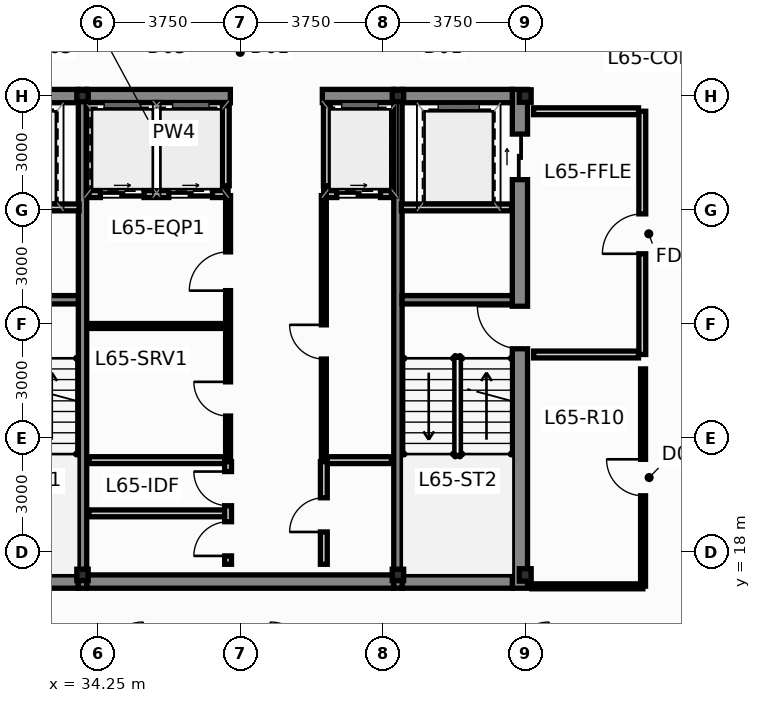
"""IFC4 building model, lengths in metres.
Left out: names, types, materials, properties, quantities, classifications, styles, units other than length and angle.
Written with IfcOpenShell. Run it as: python <this file> out.ifc"""

import sys

from ifc_helpers import new_model, si_unit, direction, frame, frame_2d, origin, origin_2d, place, context, subcontext, project, spatial, rectangle, hollow_rectangle, i_section, extrude, source, transform, mapped, element, fill, save


model = new_model("IFC4")
c1 = context("Model", 3, precision=1e-05, world=origin(), true_north=direction((0.0, 1.0)))
c2 = subcontext(c1, "Body", "Model", "MODEL_VIEW")
j1 = project(units=[si_unit("LENGTHUNIT", "METRE"), si_unit("PLANEANGLEUNIT", "RADIAN")], contexts=[c1])
p1 = place(None, origin())
s1 = spatial("IfcSite", under=j1, at=p1, CompositionType="ELEMENT")
p2 = place(p1, origin())
s2 = spatial("IfcBuilding", under=s1, at=p2, CompositionType="ELEMENT")
p3 = place(p2, frame((0.0, 0.0, 248.1)))
s3 = spatial("IfcBuildingStorey", under=s2, at=p3, CompositionType="ELEMENT", Elevation=248.1)
m1 = source(origin(), c2, "Body", "SweptSolid", [
    extrude(i_section(OverallWidth=0.311, OverallDepth=0.327, WebThickness=0.016, FlangeThickness=0.025, at=origin_2d()), origin(), (0.0, 0.0, 1.0), 3.65),
])
for number, where, z_axis, x_axis in (
    (1, (45.5, 17.4, 0.0), (0.0, 0.0, 1.0), (1.0, 0.0, 0.0)),
    (2, (45.5, 30.0, 0.0), (0.0, 0.0, 1.0), (1.0, 0.0, 0.0)),
):
    element("IfcColumn", number, at=place(p3, frame(where, z_axis=z_axis, x_axis=x_axis)), inside=s3, PredefinedType="COLUMN", context=c2, shape_type="MappedRepresentation", body=[
        mapped(m1, transform((0.0, 0.0, 0.0), scale=1.0)),
    ])
m2 = source(origin(), c2, "Body", "SweptSolid", [
    extrude(hollow_rectangle(XDim=0.3, YDim=0.3, WallThickness=0.012, at=origin_2d()), origin(), (0.0, 0.0, 1.0), 3.65),
])
for number, where, z_axis, x_axis in (
    (3, (33.85, 17.4, 0.0), (0.0, 0.0, 1.0), (1.0, 0.0, 0.0)),
    (4, (42.15, 17.4, 0.0), (0.0, 0.0, 1.0), (1.0, 0.0, 0.0)),
    (5, (33.85, 30.0, 0.0), (0.0, 0.0, 1.0), (1.0, 0.0, 0.0)),
    (6, (42.15, 30.0, 0.0), (0.0, 0.0, 1.0), (1.0, 0.0, 0.0)),
):
    element("IfcColumn", number, at=place(p3, frame(where, z_axis=z_axis, x_axis=x_axis)), inside=s3, PredefinedType="COLUMN", context=c2, shape_type="MappedRepresentation", body=[
        mapped(m2, transform((0.0, 0.0, 0.0), scale=1.0)),
    ])
p4 = place(p3, frame((45.36, 17.05, 0.0), z_axis=(0.0, 0.0, 1.0), x_axis=(0.0, 1.0, 0.0)))
e7 = element("IfcWall", 7, at=p4, inside=s3, PredefinedType="SHEAR", context=c2, shape_type="SweptSolid", body=[
    extrude(rectangle(XDim=13.125, YDim=0.4, at=frame_2d((6.562, 0.0))), origin(), (0.0, 0.0, 1.0), 3.65),
])
p5 = place(p4, frame((6.3, 0.0, 0.0)))
e8 = element("IfcOpeningElement", 8, at=p5, cuts=e7, PredefinedType="OPENING", context=c2, shape_type="SweptSolid", body=[
    extrude(rectangle(XDim=1.12, YDim=2.15, at=frame_2d((0.56, 1.075))), frame((0.0, 0.212, 0.0), z_axis=(0.0, -1.0, 0.0), x_axis=(1.0, 0.0, 0.0)), (0.0, 0.0, 1.0), 0.424),
])
p6 = place(p4, frame((10.75, 0.0, 0.0)))
e9 = element("IfcOpeningElement", 9, at=p6, cuts=e7, PredefinedType="OPENING", context=c2, shape_type="SweptSolid", body=[
    extrude(rectangle(XDim=1.2, YDim=2.2, at=frame_2d((0.6, 1.1))), frame((0.0, 0.212, 0.0), z_axis=(0.0, -1.0, 0.0), x_axis=(1.0, 0.0, 0.0)), (0.0, 0.0, 1.0), 0.424),
])
p7 = place(p3, frame((30.84, 17.225, 0.0), z_axis=(0.0, 0.0, 1.0), x_axis=(1.0, 0.0, 0.0)))
e10 = element("IfcWall", 10, at=p7, inside=s3, PredefinedType="SHEAR", context=c2, shape_type="SweptSolid", body=[
    extrude(rectangle(XDim=2.9, YDim=0.35, at=frame_2d((1.45, 0.0))), origin(), (0.0, 0.0, 1.0), 3.65),
])
p8 = place(p3, frame((33.96, 17.225, 0.0), z_axis=(0.0, 0.0, 1.0), x_axis=(1.0, 0.0, 0.0)))
e11 = element("IfcWall", 11, at=p8, inside=s3, PredefinedType="SHEAR", context=c2, shape_type="SweptSolid", body=[
    extrude(rectangle(XDim=8.08, YDim=0.35, at=frame_2d((4.04, 0.0))), origin(), (0.0, 0.0, 1.0), 3.65),
])
for number, where, z_axis, x_axis in (
    (12, (42.26, 17.225, 0.0), (0.0, 0.0, 1.0), (1.0, 0.0, 0.0)),
    (13, (30.84, 30.0, 0.0), (0.0, 0.0, 1.0), (1.0, 0.0, 0.0)),
):
    element("IfcWall", number, at=place(p3, frame(where, z_axis=z_axis, x_axis=x_axis)), inside=s3, PredefinedType="SHEAR", context=c2, shape_type="SweptSolid", body=[
        extrude(rectangle(XDim=2.9, YDim=0.35, at=frame_2d((1.45, 0.0))), origin(), (0.0, 0.0, 1.0), 3.65),
    ])
p9 = place(p3, frame((33.96, 30.0, 0.0), z_axis=(0.0, 0.0, 1.0), x_axis=(1.0, 0.0, 0.0)))
e14 = element("IfcWall", 14, at=p9, inside=s3, PredefinedType="SHEAR", context=c2, shape_type="SweptSolid", body=[
    extrude(rectangle(XDim=3.78, YDim=0.35, at=frame_2d((1.89, 0.0))), origin(), (0.0, 0.0, 1.0), 3.65),
])
p10 = place(p3, frame((40.16, 30.0, 0.0), z_axis=(0.0, 0.0, 1.0), x_axis=(1.0, 0.0, 0.0)))
e15 = element("IfcWall", 15, at=p10, inside=s3, PredefinedType="SHEAR", context=c2, shape_type="SweptSolid", body=[
    extrude(rectangle(XDim=1.88, YDim=0.35, at=frame_2d((0.94, 0.0))), origin(), (0.0, 0.0, 1.0), 3.65),
])
p11 = place(p3, frame((42.26, 30.0, 0.0), z_axis=(0.0, 0.0, 1.0), x_axis=(1.0, 0.0, 0.0)))
e16 = element("IfcWall", 16, at=p11, inside=s3, PredefinedType="SHEAR", context=c2, shape_type="SweptSolid", body=[
    extrude(rectangle(XDim=2.9, YDim=0.35, at=frame_2d((1.45, 0.0))), origin(), (0.0, 0.0, 1.0), 3.65),
])
for number, where, z_axis, x_axis in (
    (17, (33.85, 17.05, 0.0), (0.0, 0.0, 1.0), (0.0, 1.0, 0.0)),
    (18, (42.15, 17.05, 0.0), (0.0, 0.0, 1.0), (0.0, 1.0, 0.0)),
):
    element("IfcWall", number, at=place(p3, frame(where, z_axis=z_axis, x_axis=x_axis)), inside=s3, PredefinedType="SHEAR", context=c2, shape_type="SweptSolid", body=[
        extrude(rectangle(XDim=13.125, YDim=0.22, at=frame_2d((6.562, 0.0))), origin(), (0.0, 0.0, 1.0), 3.65),
    ])
for number, where, z_axis, x_axis in (
    (19, (30.84, 24.64, 0.0), (0.0, 0.0, 1.0), (1.0, 0.0, 0.0)),
    (20, (42.26, 24.64, 0.0), (0.0, 0.0, 1.0), (1.0, 0.0, 0.0)),
):
    element("IfcWall", number, at=place(p3, frame(where, z_axis=z_axis, x_axis=x_axis)), inside=s3, PredefinedType="SHEAR", context=c2, shape_type="SweptSolid", body=[
        extrude(rectangle(XDim=2.9, YDim=0.22, at=frame_2d((1.45, 0.0))), origin(), (0.0, 0.0, 1.0), 3.65),
    ])
p12 = place(p3, frame((34.02, 27.42, 0.0), z_axis=(0.0, 0.0, 1.0), x_axis=(1.0, 0.0, 0.0)))
e21 = element("IfcWall", 21, at=p12, inside=s3, PredefinedType="PARTITIONING", context=c2, shape_type="SweptSolid", body=[
    extrude(rectangle(XDim=3.66, YDim=0.18, at=frame_2d((1.83, 0.0))), origin(), (0.0, 0.0, 1.0), 3.4),
])
p13 = place(p12, frame((0.3, 0.0, 0.0)))
e22 = element("IfcOpeningElement", 22, at=p13, cuts=e21, PredefinedType="OPENING", context=c2, shape_type="SweptSolid", body=[
    extrude(rectangle(XDim=1.15, YDim=2.2, at=frame_2d((0.575, 1.1))), frame((0.0, 0.102, 0.0), z_axis=(0.0, -1.0, 0.0), x_axis=(1.0, 0.0, 0.0)), (0.0, 0.0, 1.0), 0.204),
])
p14 = place(p12, frame((2.1, 0.0, 0.0)))
e23 = element("IfcOpeningElement", 23, at=p14, cuts=e21, PredefinedType="OPENING", context=c2, shape_type="SweptSolid", body=[
    extrude(rectangle(XDim=1.15, YDim=2.2, at=frame_2d((0.575, 1.1))), frame((0.0, 0.102, 0.0), z_axis=(0.0, -1.0, 0.0), x_axis=(1.0, 0.0, 0.0)), (0.0, 0.0, 1.0), 0.204),
])
p15 = place(p3, frame((40.22, 27.42, 0.0), z_axis=(0.0, 0.0, 1.0), x_axis=(1.0, 0.0, 0.0)))
e24 = element("IfcWall", 24, at=p15, inside=s3, PredefinedType="PARTITIONING", context=c2, shape_type="SweptSolid", body=[
    extrude(rectangle(XDim=1.76, YDim=0.18, at=frame_2d((0.88, 0.0))), origin(), (0.0, 0.0, 1.0), 3.4),
])
p16 = place(p15, frame((0.32, 0.0, 0.0)))
e25 = element("IfcOpeningElement", 25, at=p16, cuts=e24, PredefinedType="OPENING", context=c2, shape_type="SweptSolid", body=[
    extrude(rectangle(XDim=1.15, YDim=2.2, at=frame_2d((0.575, 1.1))), frame((0.0, 0.102, 0.0), z_axis=(0.0, -1.0, 0.0), x_axis=(1.0, 0.0, 0.0)), (0.0, 0.0, 1.0), 0.204),
])
for number, where, z_axis, x_axis in (
    (26, (37.62, 27.64, 0.0), (0.0, 0.0, 1.0), (0.0, 1.0, 0.0)),
    (27, (40.28, 27.64, 0.0), (0.0, 0.0, 1.0), (0.0, 1.0, 0.0)),
):
    element("IfcWall", number, at=place(p3, frame(where, z_axis=z_axis, x_axis=x_axis)), inside=s3, PredefinedType="PARTITIONING", context=c2, shape_type="SweptSolid", body=[
        extrude(rectangle(XDim=2.11, YDim=0.18, at=frame_2d((1.055, 0.0))), origin(), (0.0, 0.0, 1.0), 3.4),
    ])
p17 = place(p3, frame((48.58, 23.2, 0.0), z_axis=(0.0, 0.0, 1.0), x_axis=(0.0, 1.0, 0.0)))
e28 = element("IfcWall", 28, at=p17, inside=s3, PredefinedType="PARTITIONING", context=c2, shape_type="SweptSolid", body=[
    extrude(rectangle(XDim=6.4, YDim=0.18, at=frame_2d((3.2, 0.0))), origin(), (0.0, 0.0, 1.0), 3.085),
])
p18 = place(p17, frame((2.65, 0.0, 0.0)))
e29 = element("IfcOpeningElement", 29, at=p18, cuts=e28, PredefinedType="OPENING", context=c2, shape_type="SweptSolid", body=[
    extrude(rectangle(XDim=1.05, YDim=2.15, at=frame_2d((0.525, 1.075))), frame((0.0, 0.102, 0.0), z_axis=(0.0, -1.0, 0.0), x_axis=(1.0, 0.0, 0.0)), (0.0, 0.0, 1.0), 0.204),
])
for number, where, z_axis, x_axis in (
    (30, (45.72, 23.2, 0.0), (0.0, 0.0, 1.0), (1.0, 0.0, 0.0)),
    (31, (45.72, 29.6, 0.0), (0.0, 0.0, 1.0), (1.0, 0.0, 0.0)),
):
    element("IfcWall", number, at=place(p3, frame(where, z_axis=z_axis, x_axis=x_axis)), inside=s3, PredefinedType="PARTITIONING", context=c2, shape_type="SweptSolid", body=[
        extrude(rectangle(XDim=2.76, YDim=0.18, at=frame_2d((1.38, 0.0))), origin(), (0.0, 0.0, 1.0), 3.4),
    ])
for number, where, z_axis, x_axis in (
    (32, (30.86, 27.07, 0.0), (0.0, 0.0, 1.0), (1.0, 0.0, 0.0)),
    (33, (42.24, 27.07, 0.0), (0.0, 0.0, 1.0), (1.0, 0.0, 0.0)),
):
    element("IfcWall", number, at=place(p3, frame(where, z_axis=z_axis, x_axis=x_axis)), inside=s3, PredefinedType="PARTITIONING", context=c2, shape_type="SweptSolid", body=[
        extrude(rectangle(XDim=2.9, YDim=0.18, at=frame_2d((1.45, 0.0))), origin(), (0.0, 0.0, 1.0), 3.4),
    ])
p19 = place(p3, frame((34.02, 20.42, 0.0), z_axis=(0.0, 0.0, 1.0), x_axis=(1.0, 0.0, 0.0)))
e34 = element("IfcWall", 34, at=p19, inside=s3, PredefinedType="PARTITIONING", context=c2, shape_type="SweptSolid", body=[
    extrude(rectangle(XDim=3.64, YDim=0.18, at=frame_2d((1.82, 0.0))), origin(), (0.0, 0.0, 1.0), 3.4),
])
p20 = place(p3, frame((40.22, 20.42, 0.0), z_axis=(0.0, 0.0, 1.0), x_axis=(1.0, 0.0, 0.0)))
e35 = element("IfcWall", 35, at=p20, inside=s3, PredefinedType="PARTITIONING", context=c2, shape_type="SweptSolid", body=[
    extrude(rectangle(XDim=1.76, YDim=0.18, at=frame_2d((0.88, 0.0))), origin(), (0.0, 0.0, 1.0), 3.4),
])
p21 = place(p3, frame((34.02, 23.95, 0.0), z_axis=(0.0, 0.0, 1.0), x_axis=(1.0, 0.0, 0.0)))
e36 = element("IfcWall", 36, at=p21, inside=s3, PredefinedType="PARTITIONING", context=c2, shape_type="SweptSolid", body=[
    extrude(rectangle(XDim=3.58, YDim=0.13, at=frame_2d((1.79, 0.0))), origin(), (0.0, 0.0, 1.0), 3.4),
])
p22 = place(p3, frame((37.68, 20.48, 0.0), z_axis=(0.0, 0.0, 1.0), x_axis=(0.0, 1.0, 0.0)))
e37 = element("IfcWall", 37, at=p22, inside=s3, PredefinedType="PARTITIONING", context=c2, shape_type="SweptSolid", body=[
    extrude(rectangle(XDim=6.9, YDim=0.13, at=frame_2d((3.45, 0.0))), origin(), (0.0, 0.0, 1.0), 3.4),
])
p23 = place(p22, frame((1.1, 0.0, 0.0)))
e38 = element("IfcOpeningElement", 38, at=p23, cuts=e37, PredefinedType="OPENING", context=c2, shape_type="SweptSolid", body=[
    extrude(rectangle(XDim=0.9, YDim=2.1, at=frame_2d((0.45, 1.05))), frame((0.0, 0.077, 0.0), z_axis=(0.0, -1.0, 0.0), x_axis=(1.0, 0.0, 0.0)), (0.0, 0.0, 1.0), 0.154),
])
p24 = place(p22, frame((4.4, 0.0, 0.0)))
e39 = element("IfcOpeningElement", 39, at=p24, cuts=e37, PredefinedType="OPENING", context=c2, shape_type="SweptSolid", body=[
    extrude(rectangle(XDim=1.02, YDim=2.15, at=frame_2d((0.51, 1.075))), frame((0.0, 0.077, 0.0), z_axis=(0.0, -1.0, 0.0), x_axis=(1.0, 0.0, 0.0)), (0.0, 0.0, 1.0), 0.154),
])
p25 = place(p3, frame((40.2, 20.48, 0.0), z_axis=(0.0, 0.0, 1.0), x_axis=(0.0, 1.0, 0.0)))
e40 = element("IfcWall", 40, at=p25, inside=s3, PredefinedType="PARTITIONING", context=c2, shape_type="SweptSolid", body=[
    extrude(rectangle(XDim=6.9, YDim=0.13, at=frame_2d((3.45, 0.0))), origin(), (0.0, 0.0, 1.0), 3.4),
])
p26 = place(p25, frame((2.6, 0.0, 0.0)))
e41 = element("IfcOpeningElement", 41, at=p26, cuts=e40, PredefinedType="OPENING", context=c2, shape_type="SweptSolid", body=[
    extrude(rectangle(XDim=0.9, YDim=2.1, at=frame_2d((0.45, 1.05))), frame((0.0, 0.077, 0.0), z_axis=(0.0, -1.0, 0.0), x_axis=(1.0, 0.0, 0.0)), (0.0, 0.0, 1.0), 0.154),
])
p27 = place(p3, frame((34.02, 19.02, 0.0), z_axis=(0.0, 0.0, 1.0), x_axis=(1.0, 0.0, 0.0)))
e42 = element("IfcWall", 42, at=p27, inside=s3, PredefinedType="PARTITIONING", context=c2, shape_type="SweptSolid", body=[
    extrude(rectangle(XDim=3.58, YDim=0.18, at=frame_2d((1.79, 0.0))), origin(), (0.0, 0.0, 1.0), 3.4),
])
p28 = place(p3, frame((37.68, 17.68, 0.0), z_axis=(0.0, 0.0, 1.0), x_axis=(0.0, 1.0, 0.0)))
e43 = element("IfcWall", 43, at=p28, inside=s3, PredefinedType="PARTITIONING", context=c2, shape_type="SweptSolid", body=[
    extrude(rectangle(XDim=2.7, YDim=0.18, at=frame_2d((1.35, 0.0))), origin(), (0.0, 0.0, 1.0), 3.4),
])
p29 = place(p28, frame((0.22, 0.0, 0.0)))
e44 = element("IfcOpeningElement", 44, at=p29, cuts=e43, PredefinedType="OPENING", context=c2, shape_type="SweptSolid", body=[
    extrude(rectangle(XDim=0.9, YDim=2.1, at=frame_2d((0.45, 1.05))), frame((0.0, 0.102, 0.0), z_axis=(0.0, -1.0, 0.0), x_axis=(1.0, 0.0, 0.0)), (0.0, 0.0, 1.0), 0.204),
])
p30 = place(p28, frame((1.54, 0.0, 0.0)))
e45 = element("IfcOpeningElement", 45, at=p30, cuts=e43, PredefinedType="OPENING", context=c2, shape_type="SweptSolid", body=[
    extrude(rectangle(XDim=0.9, YDim=2.1, at=frame_2d((0.45, 1.05))), frame((0.0, 0.102, 0.0), z_axis=(0.0, -1.0, 0.0), x_axis=(1.0, 0.0, 0.0)), (0.0, 0.0, 1.0), 0.204),
])
p31 = place(p3, frame((40.2, 17.68, 0.0), z_axis=(0.0, 0.0, 1.0), x_axis=(0.0, 1.0, 0.0)))
e46 = element("IfcWall", 46, at=p31, inside=s3, PredefinedType="PARTITIONING", context=c2, shape_type="SweptSolid", body=[
    extrude(rectangle(XDim=2.7, YDim=0.18, at=frame_2d((1.35, 0.0))), origin(), (0.0, 0.0, 1.0), 3.4),
])
p32 = place(p31, frame((0.85, 0.0, 0.0)))
e47 = element("IfcOpeningElement", 47, at=p32, cuts=e46, PredefinedType="OPENING", context=c2, shape_type="SweptSolid", body=[
    extrude(rectangle(XDim=0.9, YDim=2.1, at=frame_2d((0.45, 1.05))), frame((0.0, 0.102, 0.0), z_axis=(0.0, -1.0, 0.0), x_axis=(1.0, 0.0, 0.0)), (0.0, 0.0, 1.0), 0.204),
])
p33 = place(p3, frame((48.6, 17.105, 0.0), z_axis=(0.0, 0.0, 1.0), x_axis=(0.0, 1.0, 0.0)))
e48 = element("IfcWall", 48, at=p33, inside=s3, PredefinedType="PARTITIONING", context=c2, shape_type="SweptSolid", body=[
    extrude(rectangle(XDim=5.715, YDim=0.13, at=frame_2d((2.857, 0.0))), origin(), (0.0, 0.0, 1.0), 3.085),
])
p34 = place(p33, frame((2.377, 0.0, 0.0)))
e49 = element("IfcOpeningElement", 49, at=p34, cuts=e48, PredefinedType="OPENING", context=c2, shape_type="SweptSolid", body=[
    extrude(rectangle(XDim=0.96, YDim=2.15, at=frame_2d((0.48, 1.075))), frame((0.0, 0.077, 0.0), z_axis=(0.0, -1.0, 0.0), x_axis=(1.0, 0.0, 0.0)), (0.0, 0.0, 1.0), 0.154),
])
p35 = place(p3, frame((45.675, 17.1, 0.0), z_axis=(0.0, 0.0, 1.0), x_axis=(1.0, 0.0, 0.0)))
e50 = element("IfcWall", 50, at=p35, inside=s3, PredefinedType="PARTITIONING", context=c2, shape_type="SweptSolid", body=[
    extrude(rectangle(XDim=2.92, YDim=0.13, at=frame_2d((1.46, 0.0))), origin(), (0.0, 0.0, 1.0), 2.985),
])
p36 = place(p5, origin())
e51 = element("IfcDoor", 51, at=p36, inside=s3, OperationType="SINGLE_SWING_RIGHT", PredefinedType="DOOR", context=c2, shape_type="SweptSolid", body=[
    extrude(rectangle(XDim=1.12, YDim=2.15, at=frame_2d((0.56, 1.075))), frame((0.0, 0.025, 0.0), z_axis=(0.0, -1.0, 0.0), x_axis=(1.0, 0.0, 0.0)), (0.0, 0.0, 1.0), 0.05),
])
fill(e8, e51)
p37 = place(p6, origin())
e52 = element("IfcDoor", 52, at=p37, inside=s3, OperationType="SLIDING_TO_RIGHT", PredefinedType="DOOR", context=c2, shape_type="SweptSolid", body=[
    extrude(rectangle(XDim=1.2, YDim=2.2, at=frame_2d((0.6, 1.1))), frame((0.0, 0.025, 0.0), z_axis=(0.0, -1.0, 0.0), x_axis=(1.0, 0.0, 0.0)), (0.0, 0.0, 1.0), 0.05),
])
fill(e9, e52)
p38 = place(p13, origin())
e53 = element("IfcDoor", 53, at=p38, inside=s3, OperationType="SLIDING_TO_RIGHT", PredefinedType="DOOR", context=c2, shape_type="SweptSolid", body=[
    extrude(rectangle(XDim=1.15, YDim=2.2, at=frame_2d((0.575, 1.1))), frame((0.0, 0.025, 0.0), z_axis=(0.0, -1.0, 0.0), x_axis=(1.0, 0.0, 0.0)), (0.0, 0.0, 1.0), 0.05),
])
fill(e22, e53)
p39 = place(p14, origin())
e54 = element("IfcDoor", 54, at=p39, inside=s3, OperationType="SLIDING_TO_LEFT", PredefinedType="DOOR", context=c2, shape_type="SweptSolid", body=[
    extrude(rectangle(XDim=1.15, YDim=2.2, at=frame_2d((0.575, 1.1))), frame((0.0, 0.025, 0.0), z_axis=(0.0, -1.0, 0.0), x_axis=(1.0, 0.0, 0.0)), (0.0, 0.0, 1.0), 0.05),
])
fill(e23, e54)
p40 = place(p16, origin())
e55 = element("IfcDoor", 55, at=p40, inside=s3, OperationType="SLIDING_TO_RIGHT", PredefinedType="DOOR", context=c2, shape_type="SweptSolid", body=[
    extrude(rectangle(XDim=1.15, YDim=2.2, at=frame_2d((0.575, 1.1))), frame((0.0, 0.025, 0.0), z_axis=(0.0, -1.0, 0.0), x_axis=(1.0, 0.0, 0.0)), (0.0, 0.0, 1.0), 0.05),
])
fill(e25, e55)
p41 = place(p18, origin())
e56 = element("IfcDoor", 56, at=p41, inside=s3, OperationType="SINGLE_SWING_LEFT", PredefinedType="DOOR", context=c2, shape_type="SweptSolid", body=[
    extrude(rectangle(XDim=1.05, YDim=2.15, at=frame_2d((0.525, 1.075))), frame((0.0, 0.025, 0.0), z_axis=(0.0, -1.0, 0.0), x_axis=(1.0, 0.0, 0.0)), (0.0, 0.0, 1.0), 0.05),
])
fill(e29, e56)
p42 = place(p23, origin())
e57 = element("IfcDoor", 57, at=p42, inside=s3, OperationType="SINGLE_SWING_RIGHT", PredefinedType="DOOR", context=c2, shape_type="SweptSolid", body=[
    extrude(rectangle(XDim=0.9, YDim=2.1, at=frame_2d((0.45, 1.05))), frame((0.0, 0.025, 0.0), z_axis=(0.0, -1.0, 0.0), x_axis=(1.0, 0.0, 0.0)), (0.0, 0.0, 1.0), 0.05),
])
fill(e38, e57)
p43 = place(p24, origin())
e58 = element("IfcDoor", 58, at=p43, inside=s3, OperationType="SINGLE_SWING_LEFT", PredefinedType="DOOR", context=c2, shape_type="SweptSolid", body=[
    extrude(rectangle(XDim=1.02, YDim=2.15, at=frame_2d((0.51, 1.075))), frame((0.0, 0.025, 0.0), z_axis=(0.0, -1.0, 0.0), x_axis=(1.0, 0.0, 0.0)), (0.0, 0.0, 1.0), 0.05),
])
fill(e39, e58)
p44 = place(p26, origin())
e59 = element("IfcDoor", 59, at=p44, inside=s3, OperationType="SINGLE_SWING_RIGHT", PredefinedType="DOOR", context=c2, shape_type="SweptSolid", body=[
    extrude(rectangle(XDim=0.9, YDim=2.1, at=frame_2d((0.45, 1.05))), frame((0.0, 0.025, 0.0), z_axis=(0.0, -1.0, 0.0), x_axis=(1.0, 0.0, 0.0)), (0.0, 0.0, 1.0), 0.05),
])
fill(e41, e59)
p45 = place(p29, origin())
e60 = element("IfcDoor", 60, at=p45, inside=s3, OperationType="SINGLE_SWING_LEFT", PredefinedType="DOOR", context=c2, shape_type="SweptSolid", body=[
    extrude(rectangle(XDim=0.9, YDim=2.1, at=frame_2d((0.45, 1.05))), frame((0.0, 0.025, 0.0), z_axis=(0.0, -1.0, 0.0), x_axis=(1.0, 0.0, 0.0)), (0.0, 0.0, 1.0), 0.05),
])
fill(e44, e60)
p46 = place(p30, origin())
e61 = element("IfcDoor", 61, at=p46, inside=s3, OperationType="SINGLE_SWING_RIGHT", PredefinedType="DOOR", context=c2, shape_type="SweptSolid", body=[
    extrude(rectangle(XDim=0.9, YDim=2.1, at=frame_2d((0.45, 1.05))), frame((0.0, 0.025, 0.0), z_axis=(0.0, -1.0, 0.0), x_axis=(1.0, 0.0, 0.0)), (0.0, 0.0, 1.0), 0.05),
])
fill(e45, e61)
p47 = place(p32, origin())
e62 = element("IfcDoor", 62, at=p47, inside=s3, OperationType="SINGLE_SWING_LEFT", PredefinedType="DOOR", context=c2, shape_type="SweptSolid", body=[
    extrude(rectangle(XDim=0.9, YDim=2.1, at=frame_2d((0.45, 1.05))), frame((0.0, 0.025, 0.0), z_axis=(0.0, -1.0, 0.0), x_axis=(1.0, 0.0, 0.0)), (0.0, 0.0, 1.0), 0.05),
])
fill(e47, e62)
p48 = place(p34, origin())
e63 = element("IfcDoor", 63, at=p48, inside=s3, OperationType="SINGLE_SWING_RIGHT", PredefinedType="DOOR", context=c2, shape_type="SweptSolid", body=[
    extrude(rectangle(XDim=0.96, YDim=2.15, at=frame_2d((0.48, 1.075))), frame((0.0, 0.025, 0.0), z_axis=(0.0, -1.0, 0.0), x_axis=(1.0, 0.0, 0.0)), (0.0, 0.0, 1.0), 0.05),
])
fill(e49, e63)
save(model, sys.argv[1])
